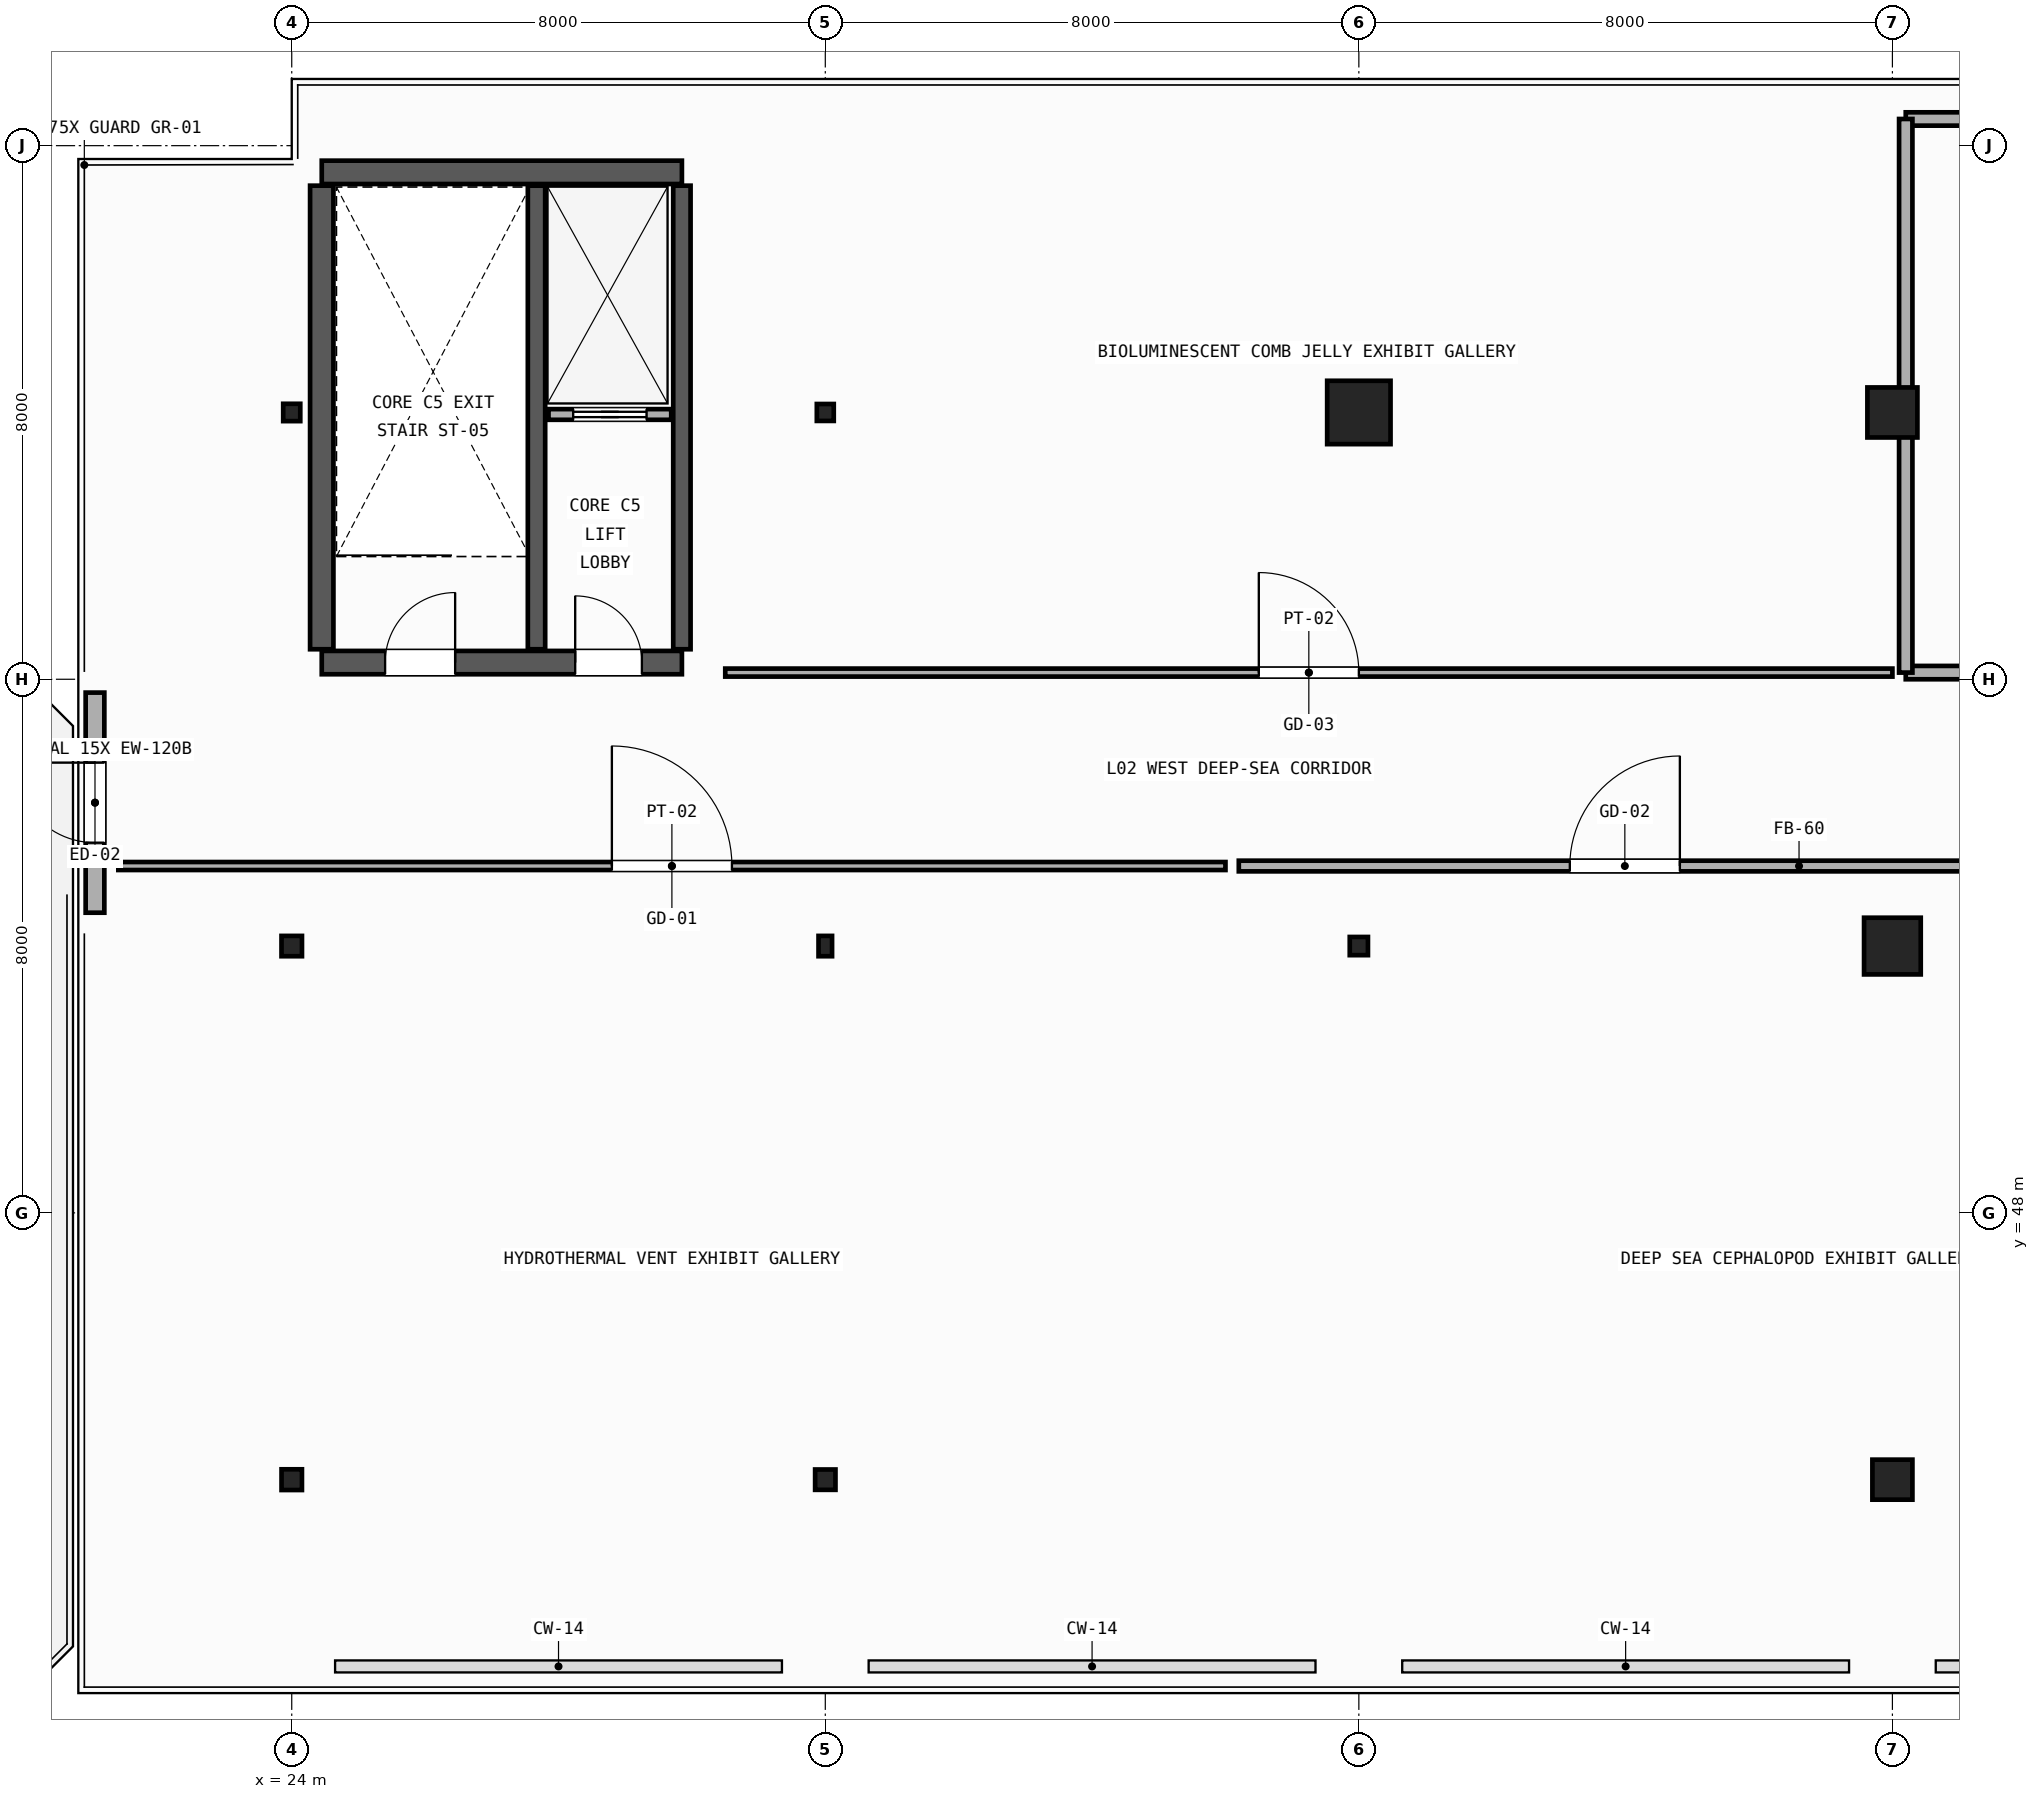
"""IFC4 building model, lengths in metres.
Left out: names, types, materials, properties, quantities, classifications, styles, units other than length and angle.
Written with IfcOpenShell. Run it as: python <this file> out.ifc"""

import sys

from ifc_helpers import new_model, si_unit, direction, frame, frame_2d, origin, origin_2d, place, context, subcontext, project, spatial, rectangle, hollow_rectangle, circle, hollow_circle, i_section, extrude, element, fill, save


model = new_model("IFC4")
c1 = context("Model", 3, precision=1e-05, world=origin(), true_north=direction((0.0, 1.0)))
c2 = subcontext(c1, "Body", "Model", "MODEL_VIEW")
j1 = project(units=[si_unit("LENGTHUNIT", "METRE"), si_unit("PLANEANGLEUNIT", "RADIAN")], contexts=[c1])
p1 = place(None, origin())
s1 = spatial("IfcSite", under=j1, at=p1, CompositionType="ELEMENT")
p2 = place(p1, origin())
s2 = spatial("IfcBuilding", under=s1, at=p2, CompositionType="ELEMENT")
p3 = place(p2, frame((0.0, 0.0, 10.2)))
s3 = spatial("IfcBuildingStorey", under=s2, at=p3, CompositionType="ELEMENT", Elevation=10.2)
p4 = place(p3, frame((24.0, 44.0, 0.0), z_axis=(0.0, 0.0, 1.0), x_axis=(1.0, 0.0, 0.0)))
e1 = element("IfcColumn", 1, at=p4, inside=s3, PredefinedType="COLUMN", context=c2, shape_type="SweptSolid", body=[
    extrude(i_section(OverallWidth=0.306, OverallDepth=0.311, WebThickness=0.011, FlangeThickness=0.017, FilletRadius=0.013, at=origin_2d()), origin(), (0.0, 0.0, 1.0), 4.8),
])
p5 = place(p3, frame((24.0, 52.0, 0.0), z_axis=(0.0, 0.0, 1.0), x_axis=(0.0, 1.0, 0.0)))
e2 = element("IfcColumn", 2, at=p5, inside=s3, PredefinedType="COLUMN", context=c2, shape_type="SweptSolid", body=[
    extrude(i_section(OverallWidth=0.305, OverallDepth=0.307, WebThickness=0.01, FlangeThickness=0.015, FilletRadius=0.013, at=origin_2d()), origin(), (0.0, 0.0, 1.0), 4.8),
])
p6 = place(p3, frame((24.0, 60.0, 0.0), z_axis=(0.0, 0.0, 1.0), x_axis=(1.0, 0.0, 0.0)))
e3 = element("IfcColumn", 3, at=p6, inside=s3, PredefinedType="COLUMN", context=c2, shape_type="SweptSolid", body=[
    extrude(i_section(OverallWidth=0.256, OverallDepth=0.26, WebThickness=0.011, FlangeThickness=0.017, FilletRadius=0.011, at=origin_2d()), origin(), (0.0, 0.0, 1.0), 4.8),
])
p7 = place(p3, frame((32.0, 44.0, 0.0), z_axis=(0.0, 0.0, 1.0), x_axis=(0.0, 1.0, 0.0)))
e4 = element("IfcColumn", 4, at=p7, inside=s3, PredefinedType="COLUMN", context=c2, shape_type="SweptSolid", body=[
    extrude(hollow_rectangle(XDim=0.305, YDim=0.305, WallThickness=0.012, InnerFilletRadius=0.012, OuterFilletRadius=0.024, at=origin_2d()), origin(), (0.0, 0.0, 1.0), 4.8),
])
p8 = place(p3, frame((32.0, 52.0, 0.0), z_axis=(0.0, 0.0, 1.0), x_axis=(1.0, 0.0, 0.0)))
e5 = element("IfcColumn", 5, at=p8, inside=s3, PredefinedType="COLUMN", context=c2, shape_type="SweptSolid", body=[
    extrude(hollow_rectangle(XDim=0.203, YDim=0.305, WallThickness=0.009, InnerFilletRadius=0.009, OuterFilletRadius=0.018, at=origin_2d()), origin(), (0.0, 0.0, 1.0), 4.8),
])
p9 = place(p3, frame((32.0, 60.0, 0.0), z_axis=(0.0, 0.0, 1.0), x_axis=(0.0, 1.0, 0.0)))
e6 = element("IfcColumn", 6, at=p9, inside=s3, PredefinedType="COLUMN", context=c2, shape_type="SweptSolid", body=[
    extrude(hollow_rectangle(XDim=0.254, YDim=0.254, WallThickness=0.012, InnerFilletRadius=0.012, OuterFilletRadius=0.024, at=origin_2d()), origin(), (0.0, 0.0, 1.0), 4.8),
])
p10 = place(p3, frame((40.0, 52.0, 0.0), z_axis=(0.0, 0.0, 1.0), x_axis=(0.0, 1.0, 0.0)))
e7 = element("IfcColumn", 7, at=p10, inside=s3, PredefinedType="COLUMN", context=c2, shape_type="SweptSolid", body=[
    extrude(hollow_circle(Radius=0.136, WallThickness=0.012, at=origin_2d()), origin(), (0.0, 0.0, 1.0), 7.05),
])
p11 = place(p3, frame((40.0, 60.0, 0.0), z_axis=(0.0, 0.0, 1.0), x_axis=(1.0, 0.0, 0.0)))
e8 = element("IfcColumn", 8, at=p11, inside=s3, PredefinedType="COLUMN", context=c2, shape_type="SweptSolid", body=[
    extrude(rectangle(XDim=0.95, YDim=0.95, at=origin_2d()), origin(), (0.0, 0.0, 1.0), 7.05),
])
p12 = place(p3, frame((48.0, 44.0, 0.0), z_axis=(0.0, 0.0, 1.0), x_axis=(0.0, 1.0, 0.0)))
e9 = element("IfcColumn", 9, at=p12, inside=s3, PredefinedType="COLUMN", context=c2, shape_type="SweptSolid", body=[
    extrude(rectangle(XDim=0.6, YDim=0.6, at=origin_2d()), origin(), (0.0, 0.0, 1.0), 4.8),
])
p13 = place(p3, frame((48.0, 52.0, 0.0), z_axis=(0.0, 0.0, 1.0), x_axis=(1.0, 0.0, 0.0)))
e10 = element("IfcColumn", 10, at=p13, inside=s3, PredefinedType="COLUMN", context=c2, shape_type="SweptSolid", body=[
    extrude(circle(Radius=0.425, at=origin_2d()), origin(), (0.0, 0.0, 1.0), 4.8),
])
p14 = place(p3, frame((48.0, 60.0, 0.0), z_axis=(0.0, 0.0, 1.0), x_axis=(0.0, 1.0, 0.0)))
e11 = element("IfcColumn", 11, at=p14, inside=s3, PredefinedType="COLUMN", context=c2, shape_type="SweptSolid", body=[
    extrude(circle(Radius=0.375, at=origin_2d()), origin(), (0.0, 0.0, 1.0), 4.8),
])
p15 = place(p3, frame((21.05, 52.5, 0.0), z_axis=(0.0, 0.0, 1.0), x_axis=(0.0, 1.0, 0.0)))
e12 = element("IfcWall", 12, at=p15, inside=s3, PredefinedType="STANDARD", context=c2, shape_type="SweptSolid", body=[
    extrude(rectangle(XDim=3.3, YDim=0.28, at=frame_2d((1.65, 0.0))), origin(), (0.0, 0.0, 1.0), 4.4),
])
p16 = place(p15, frame((1.05, 0.0, 0.0)))
e13 = element("IfcOpeningElement", 13, at=p16, cuts=e12, PredefinedType="OPENING", context=c2, shape_type="SweptSolid", body=[
    extrude(rectangle(XDim=1.2, YDim=2.15, at=frame_2d((0.6, 1.075))), frame((0.0, 0.15, 0.0), z_axis=(0.0, -1.0, 0.0), x_axis=(1.0, 0.0, 0.0)), (0.0, 0.0, 1.0), 0.3),
])
p17 = place(p3, frame((24.45, 56.25, 0.0), z_axis=(0.0, 0.0, 1.0), x_axis=(1.0, 0.0, 0.0)))
e14 = element("IfcWall", 14, at=p17, inside=s3, PredefinedType="SHEAR", context=c2, shape_type="SweptSolid", body=[
    extrude(rectangle(XDim=5.4, YDim=0.35, at=frame_2d((2.7, 0.0))), origin(), (0.0, 0.0, 1.0), 4.3),
])
p18 = place(p17, frame((0.95, 0.0, 0.0)))
e15 = element("IfcOpeningElement", 15, at=p18, cuts=e14, PredefinedType="OPENING", context=c2, shape_type="SweptSolid", body=[
    extrude(rectangle(XDim=1.05, YDim=2.1, at=frame_2d((0.525, 1.05))), frame((0.0, 0.185, 0.0), z_axis=(0.0, -1.0, 0.0), x_axis=(1.0, 0.0, 0.0)), (0.0, 0.0, 1.0), 0.37),
])
p19 = place(p17, frame((3.8, 0.0, 0.0)))
e16 = element("IfcOpeningElement", 16, at=p19, cuts=e14, PredefinedType="OPENING", context=c2, shape_type="SweptSolid", body=[
    extrude(rectangle(XDim=1.0, YDim=2.15, at=frame_2d((0.5, 1.075))), frame((0.0, 0.185, 0.0), z_axis=(0.0, -1.0, 0.0), x_axis=(1.0, 0.0, 0.0)), (0.0, 0.0, 1.0), 0.37),
])
p20 = place(p3, frame((24.45, 63.6, 0.0), z_axis=(0.0, 0.0, 1.0), x_axis=(1.0, 0.0, 0.0)))
e17 = element("IfcWall", 17, at=p20, inside=s3, PredefinedType="SHEAR", context=c2, shape_type="SweptSolid", body=[
    extrude(rectangle(XDim=5.4, YDim=0.35, at=frame_2d((2.7, 0.0))), origin(), (0.0, 0.0, 1.0), 4.3),
])
p21 = place(p3, frame((24.45, 56.45, 0.0), z_axis=(0.0, 0.0, 1.0), x_axis=(0.0, 1.0, 0.0)))
e18 = element("IfcWall", 18, at=p21, inside=s3, PredefinedType="SHEAR", context=c2, shape_type="SweptSolid", body=[
    extrude(rectangle(XDim=6.95, YDim=0.35, at=frame_2d((3.475, 0.0))), origin(), (0.0, 0.0, 1.0), 4.3),
])
for number, where, z_axis, x_axis in (
    (19, (29.85, 56.45, 0.0), (0.0, 0.0, 1.0), (0.0, 1.0, 0.0)),
    (20, (27.67, 56.45, 0.0), (0.0, 0.0, 1.0), (0.0, 1.0, 0.0)),
):
    element("IfcWall", number, at=place(p3, frame(where, z_axis=z_axis, x_axis=x_axis)), inside=s3, PredefinedType="SHEAR", context=c2, shape_type="SweptSolid", body=[
        extrude(rectangle(XDim=6.95, YDim=0.26, at=frame_2d((3.475, 0.0))), origin(), (0.0, 0.0, 1.0), 4.3),
    ])
p22 = place(p3, frame((27.85, 59.97, 0.0), z_axis=(0.0, 0.0, 1.0), x_axis=(1.0, 0.0, 0.0)))
e21 = element("IfcWall", 21, at=p22, inside=s3, PredefinedType="PARTITIONING", context=c2, shape_type="SweptSolid", body=[
    extrude(rectangle(XDim=1.84, YDim=0.16, at=frame_2d((0.92, 0.0))), origin(), (0.0, 0.0, 1.0), 3.6),
])
p23 = place(p22, frame((0.37, 0.0, 0.0)))
e22 = element("IfcOpeningElement", 22, at=p23, cuts=e21, PredefinedType="OPENING", context=c2, shape_type="SweptSolid", body=[
    extrude(rectangle(XDim=1.1, YDim=2.15, at=frame_2d((0.55, 1.075))), frame((0.0, 0.09, 0.0), z_axis=(0.0, -1.0, 0.0), x_axis=(1.0, 0.0, 0.0)), (0.0, 0.0, 1.0), 0.18),
])
p24 = place(p3, frame((21.4, 53.2, 0.0), z_axis=(0.0, 0.0, 1.0), x_axis=(1.0, 0.0, 0.0)))
e23 = element("IfcWall", 23, at=p24, inside=s3, PredefinedType="PARTITIONING", context=c2, shape_type="SweptSolid", body=[
    extrude(rectangle(XDim=16.6, YDim=0.12, at=frame_2d((8.3, 0.0))), origin(), (0.0, 0.0, 1.0), 4.047),
])
p25 = place(p24, frame((7.4, 0.0, 0.0)))
e24 = element("IfcOpeningElement", 24, at=p25, cuts=e23, PredefinedType="OPENING", context=c2, shape_type="SweptSolid", body=[
    extrude(rectangle(XDim=1.8, YDim=2.4, at=frame_2d((0.9, 1.2))), frame((0.0, 0.07, 0.0), z_axis=(0.0, -1.0, 0.0), x_axis=(1.0, 0.0, 0.0)), (0.0, 0.0, 1.0), 0.14),
])
p26 = place(p3, frame((38.2, 53.2, 0.0), z_axis=(0.0, 0.0, 1.0), x_axis=(1.0, 0.0, 0.0)))
e25 = element("IfcWall", 25, at=p26, inside=s3, PredefinedType="PARTITIONING", context=c2, shape_type="SweptSolid", body=[
    extrude(rectangle(XDim=16.8, YDim=0.16, at=frame_2d((8.4, 0.0))), origin(), (0.0, 0.0, 1.0), 4.29),
])
p27 = place(p26, frame((4.963, 0.0, 0.0)))
e26 = element("IfcOpeningElement", 26, at=p27, cuts=e25, PredefinedType="OPENING", context=c2, shape_type="SweptSolid", body=[
    extrude(rectangle(XDim=1.65, YDim=2.35, at=frame_2d((0.825, 1.175))), frame((0.0, 0.09, 0.0), z_axis=(0.0, -1.0, 0.0), x_axis=(1.0, 0.0, 0.0)), (0.0, 0.0, 1.0), 0.18),
])
p28 = place(p3, frame((30.5, 56.1, 0.0), z_axis=(0.0, 0.0, 1.0), x_axis=(1.0, 0.0, 0.0)))
e27 = element("IfcWall", 27, at=p28, inside=s3, PredefinedType="PARTITIONING", context=c2, shape_type="SweptSolid", body=[
    extrude(rectangle(XDim=17.5, YDim=0.12, at=frame_2d((8.75, 0.0))), origin(), (0.0, 0.0, 1.0), 4.29),
])
p29 = place(p28, frame((8.0, 0.0, 0.0)))
e28 = element("IfcOpeningElement", 28, at=p29, cuts=e27, PredefinedType="OPENING", context=c2, shape_type="SweptSolid", body=[
    extrude(rectangle(XDim=1.5, YDim=2.3, at=frame_2d((0.75, 1.15))), frame((0.0, 0.07, 0.0), z_axis=(0.0, -1.0, 0.0), x_axis=(1.0, 0.0, 0.0)), (0.0, 0.0, 1.0), 0.14),
])
p30 = place(p3, frame((48.2, 56.1, 0.0), z_axis=(0.0, 0.0, 1.0), x_axis=(1.0, 0.0, 0.0)))
e29 = element("IfcWall", 29, at=p30, inside=s3, PredefinedType="PLUMBINGWALL", context=c2, shape_type="SweptSolid", body=[
    extrude(rectangle(XDim=6.8, YDim=0.2, at=frame_2d((3.4, 0.0))), origin(), (0.0, 0.0, 1.0), 4.29),
])
p31 = place(p30, frame((2.945, 0.0, 0.0)))
e30 = element("IfcOpeningElement", 30, at=p31, cuts=e29, PredefinedType="OPENING", context=c2, shape_type="SweptSolid", body=[
    extrude(rectangle(XDim=0.91, YDim=2.1, at=frame_2d((0.455, 1.05))), frame((0.0, 0.11, 0.0), z_axis=(0.0, -1.0, 0.0), x_axis=(1.0, 0.0, 0.0)), (0.0, 0.0, 1.0), 0.22),
])
p32 = place(p3, frame((48.2, 64.4, 0.0), z_axis=(0.0, 0.0, 1.0), x_axis=(1.0, 0.0, 0.0)))
e31 = element("IfcWall", 31, at=p32, inside=s3, PredefinedType="PLUMBINGWALL", context=c2, shape_type="SweptSolid", body=[
    extrude(rectangle(XDim=6.8, YDim=0.2, at=frame_2d((3.4, 0.0))), origin(), (0.0, 0.0, 1.0), 4.29),
])
p33 = place(p3, frame((48.2, 56.1, 0.0), z_axis=(0.0, 0.0, 1.0), x_axis=(0.0, 1.0, 0.0)))
e32 = element("IfcWall", 32, at=p33, inside=s3, PredefinedType="PLUMBINGWALL", context=c2, shape_type="SweptSolid", body=[
    extrude(rectangle(XDim=8.3, YDim=0.2, at=frame_2d((4.15, 0.0))), origin(), (0.0, 0.0, 1.0), 3.957),
])
p34 = place(p16, origin())
e33 = element("IfcDoor", 33, at=p34, inside=s3, OperationType="SINGLE_SWING_RIGHT", PredefinedType="DOOR", context=c2, shape_type="SweptSolid", body=[
    extrude(rectangle(XDim=1.2, YDim=2.15, at=frame_2d((0.6, 1.075))), frame((0.0, 0.025, 0.0), z_axis=(0.0, -1.0, 0.0), x_axis=(1.0, 0.0, 0.0)), (0.0, 0.0, 1.0), 0.05),
])
fill(e13, e33)
p35 = place(p23, origin())
e34 = element("IfcDoor", 34, at=p35, inside=s3, OperationType="SLIDING_TO_LEFT", PredefinedType="DOOR", context=c2, shape_type="SweptSolid", body=[
    extrude(rectangle(XDim=1.1, YDim=2.15, at=frame_2d((0.55, 1.075))), frame((0.0, 0.025, 0.0), z_axis=(0.0, -1.0, 0.0), x_axis=(1.0, 0.0, 0.0)), (0.0, 0.0, 1.0), 0.05),
])
fill(e22, e34)
p36 = place(p18, origin())
e35 = element("IfcDoor", 35, at=p36, inside=s3, OperationType="SINGLE_SWING_RIGHT", PredefinedType="DOOR", context=c2, shape_type="SweptSolid", body=[
    extrude(rectangle(XDim=1.05, YDim=2.1, at=frame_2d((0.525, 1.05))), frame((0.0, 0.025, 0.0), z_axis=(0.0, -1.0, 0.0), x_axis=(1.0, 0.0, 0.0)), (0.0, 0.0, 1.0), 0.05),
])
fill(e15, e35)
p37 = place(p19, origin())
e36 = element("IfcDoor", 36, at=p37, inside=s3, OperationType="SINGLE_SWING_LEFT", PredefinedType="DOOR", context=c2, shape_type="SweptSolid", body=[
    extrude(rectangle(XDim=1.0, YDim=2.15, at=frame_2d((0.5, 1.075))), frame((0.0, 0.025, 0.0), z_axis=(0.0, -1.0, 0.0), x_axis=(1.0, 0.0, 0.0)), (0.0, 0.0, 1.0), 0.05),
])
fill(e16, e36)
p38 = place(p25, origin())
e37 = element("IfcDoor", 37, at=p38, inside=s3, OperationType="SINGLE_SWING_LEFT", PredefinedType="DOOR", context=c2, shape_type="SweptSolid", body=[
    extrude(rectangle(XDim=1.8, YDim=2.4, at=frame_2d((0.9, 1.2))), frame((0.0, 0.025, 0.0), z_axis=(0.0, -1.0, 0.0), x_axis=(1.0, 0.0, 0.0)), (0.0, 0.0, 1.0), 0.05),
])
fill(e24, e37)
p39 = place(p27, origin())
e38 = element("IfcDoor", 38, at=p39, inside=s3, OperationType="SINGLE_SWING_RIGHT", PredefinedType="DOOR", context=c2, shape_type="SweptSolid", body=[
    extrude(rectangle(XDim=1.65, YDim=2.35, at=frame_2d((0.825, 1.175))), frame((0.0, 0.025, 0.0), z_axis=(0.0, -1.0, 0.0), x_axis=(1.0, 0.0, 0.0)), (0.0, 0.0, 1.0), 0.05),
])
fill(e26, e38)
p40 = place(p29, origin())
e39 = element("IfcDoor", 39, at=p40, inside=s3, OperationType="SINGLE_SWING_LEFT", PredefinedType="DOOR", context=c2, shape_type="SweptSolid", body=[
    extrude(rectangle(XDim=1.5, YDim=2.3, at=frame_2d((0.75, 1.15))), frame((0.0, 0.025, 0.0), z_axis=(0.0, -1.0, 0.0), x_axis=(1.0, 0.0, 0.0)), (0.0, 0.0, 1.0), 0.05),
])
fill(e28, e39)
save(model, sys.argv[1])
